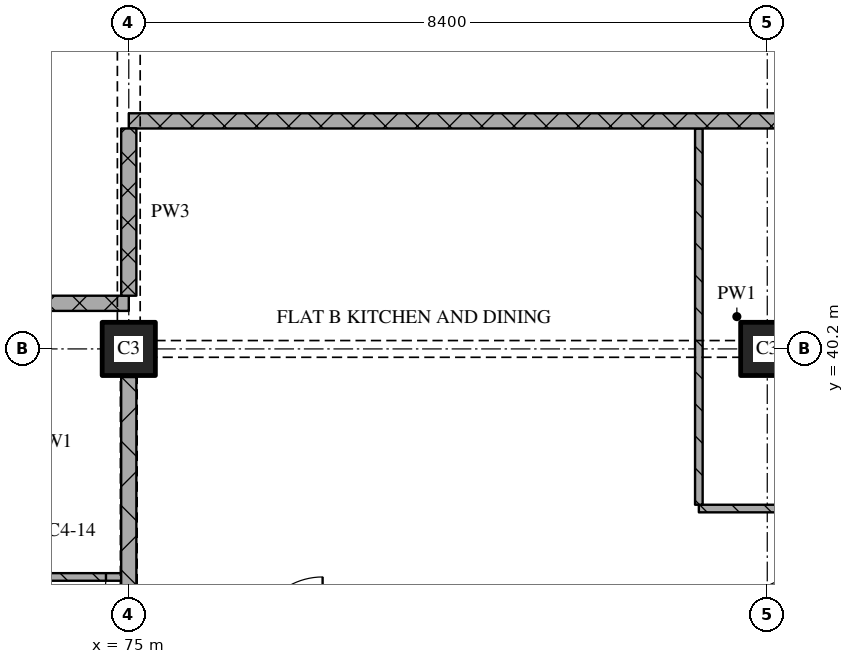
"""IFC4 building model, lengths in metres.
Left out: names, types, materials, properties, quantities, classifications, styles, units other than length and angle.
Written with IfcOpenShell. Run it as: python <this file> out.ifc"""

import sys

from ifc_helpers import new_model, si_unit, direction, frame, frame_2d, origin, origin_2d, place, context, subcontext, project, spatial, rectangle, extrude, element, fill, save


model = new_model("IFC4")
c1 = context("Model", 3, precision=1e-05, world=origin(), true_north=direction((0.0, 1.0)))
c2 = subcontext(c1, "Body", "Model", "MODEL_VIEW")
j1 = project(units=[si_unit("LENGTHUNIT", "METRE"), si_unit("PLANEANGLEUNIT", "RADIAN")], contexts=[c1])
p1 = place(None, origin())
s1 = spatial("IfcSite", under=j1, at=p1, CompositionType="ELEMENT")
p2 = place(p1, origin())
s2 = spatial("IfcBuilding", under=s1, at=p2, CompositionType="ELEMENT")
p3 = place(p2, frame((0.0, 0.0, 179.85)))
s3 = spatial("IfcBuildingStorey", under=s2, at=p3, CompositionType="ELEMENT", Elevation=179.85)
for number, where, z_axis, x_axis in (
    (1, (75.0, 40.2, 0.0), (0.0, 0.0, 1.0), (1.0, 0.0, 0.0)),
    (2, (83.4, 40.2, 0.0), (0.0, 0.0, 1.0), (1.0, 0.0, 0.0)),
):
    element("IfcColumn", number, at=place(p3, frame(where, z_axis=z_axis, x_axis=x_axis)), inside=s3, PredefinedType="COLUMN", context=c2, shape_type="SweptSolid", body=[
        extrude(rectangle(XDim=0.7, YDim=0.7, at=origin_2d()), origin(), (0.0, 0.0, 1.0), 3.6),
    ])
p4 = place(p3, frame((64.5, 37.2, 0.0), z_axis=(0.0, 0.0, 1.0), x_axis=(1.0, 0.0, 0.0)))
e3 = element("IfcWall", 3, at=p4, inside=s3, PredefinedType="PARTITIONING", context=c2, shape_type="SweptSolid", body=[
    extrude(rectangle(XDim=10.4, YDim=0.1, at=frame_2d((5.2, 0.0))), origin(), (0.0, 0.0, 1.0), 3.32),
])
p5 = place(p4, frame((6.35, 0.0, 0.0)))
e4 = element("IfcOpeningElement", 4, at=p5, cuts=e3, PredefinedType="OPENING", context=c2, shape_type="SweptSolid", body=[
    extrude(rectangle(XDim=0.8, YDim=2.1, at=frame_2d((0.4, 1.05))), frame((0.0, 0.06, 0.0), z_axis=(0.0, -1.0, 0.0), x_axis=(1.0, 0.0, 0.0)), (0.0, 0.0, 1.0), 0.12),
])
p6 = place(p4, frame((9.3, 0.0, 0.0)))
e5 = element("IfcOpeningElement", 5, at=p6, cuts=e3, PredefinedType="OPENING", context=c2, shape_type="SweptSolid", body=[
    extrude(rectangle(XDim=0.9, YDim=2.1, at=frame_2d((0.45, 1.05))), frame((0.0, 0.06, 0.0), z_axis=(0.0, -1.0, 0.0), x_axis=(1.0, 0.0, 0.0)), (0.0, 0.0, 1.0), 0.12),
])
p7 = place(p3, frame((82.5, 38.1, 0.0), z_axis=(0.0, 0.0, 1.0), x_axis=(1.0, 0.0, 0.0)))
e6 = element("IfcWall", 6, at=p7, inside=s3, PredefinedType="PARTITIONING", context=c2, shape_type="SweptSolid", body=[
    extrude(rectangle(XDim=5.7, YDim=0.1, at=frame_2d((2.85, 0.0))), origin(), (0.0, 0.0, 1.0), 3.32),
])
p8 = place(p3, frame((75.0, 40.8, 0.0), z_axis=(0.0, 0.0, 1.0), x_axis=(-1.0, 0.0, 0.0)))
e7 = element("IfcWall", 7, at=p8, inside=s3, PredefinedType="PARTITIONING", context=c2, shape_type="SweptSolid", body=[
    extrude(rectangle(XDim=24.28, YDim=0.2, at=frame_2d((12.14, 0.0))), origin(), (0.0, 0.0, 1.0), 3.32),
])
p9 = place(p8, frame((10.75, 0.0, 0.0)))
e8 = element("IfcOpeningElement", 8, at=p9, cuts=e7, PredefinedType="OPENING", context=c2, shape_type="SweptSolid", body=[
    extrude(rectangle(XDim=1.0, YDim=2.1, at=frame_2d((0.5, 1.05))), frame((0.0, 0.11, 0.0), z_axis=(0.0, -1.0, 0.0), x_axis=(1.0, 0.0, 0.0)), (0.0, 0.0, 1.0), 0.22),
])
p10 = place(p3, frame((100.2, 43.2, 0.0), z_axis=(0.0, 0.0, 1.0), x_axis=(-1.0, 0.0, 0.0)))
e9 = element("IfcWall", 9, at=p10, inside=s3, PredefinedType="PARTITIONING", context=c2, shape_type="SweptSolid", body=[
    extrude(rectangle(XDim=25.2, YDim=0.2, at=frame_2d((12.6, 0.0))), origin(), (0.0, 0.0, 1.0), 3.32),
])
p11 = place(p10, frame((10.75, 0.0, 0.0)))
e10 = element("IfcOpeningElement", 10, at=p11, cuts=e9, PredefinedType="OPENING", context=c2, shape_type="SweptSolid", body=[
    extrude(rectangle(XDim=1.0, YDim=2.1, at=frame_2d((0.5, 1.05))), frame((0.0, 0.11, 0.0), z_axis=(0.0, -1.0, 0.0), x_axis=(1.0, 0.0, 0.0)), (0.0, 0.0, 1.0), 0.22),
])
p12 = place(p3, frame((75.0, 43.1, 0.0), z_axis=(0.0, 0.0, 1.0), x_axis=(0.0, -1.0, 0.0)))
e11 = element("IfcWall", 11, at=p12, inside=s3, PredefinedType="PARTITIONING", context=c2, shape_type="SweptSolid", body=[
    extrude(rectangle(XDim=2.2, YDim=0.2, at=frame_2d((1.1, 0.0))), origin(), (0.0, 0.0, 1.0), 2.43),
])
p13 = place(p3, frame((75.0, 39.83, 0.0), z_axis=(0.0, 0.0, 1.0), x_axis=(0.0, -1.0, 0.0)))
e12 = element("IfcWall", 12, at=p13, inside=s3, PredefinedType="PARTITIONING", context=c2, shape_type="SweptSolid", body=[
    extrude(rectangle(XDim=7.66, YDim=0.2, at=frame_2d((3.83, 0.0))), origin(), (0.0, 0.0, 1.0), 2.72),
])
p14 = place(p3, frame((82.5, 43.1, 0.0), z_axis=(0.0, 0.0, 1.0), x_axis=(0.0, -1.0, 0.0)))
e13 = element("IfcWall", 13, at=p14, inside=s3, PredefinedType="PARTITIONING", context=c2, shape_type="SweptSolid", body=[
    extrude(rectangle(XDim=4.95, YDim=0.1, at=frame_2d((2.475, 0.0))), origin(), (0.0, 0.0, 1.0), 3.32),
])
p15 = place(p6, origin())
e14 = element("IfcDoor", 14, at=p15, inside=s3, OperationType="SINGLE_SWING_RIGHT", PredefinedType="DOOR", context=c2, shape_type="SweptSolid", body=[
    extrude(rectangle(XDim=0.9, YDim=2.1, at=frame_2d((0.45, 1.05))), frame((0.0, 0.025, 0.0), z_axis=(0.0, -1.0, 0.0), x_axis=(1.0, 0.0, 0.0)), (0.0, 0.0, 1.0), 0.05),
])
fill(e5, e14)
save(model, sys.argv[1])
